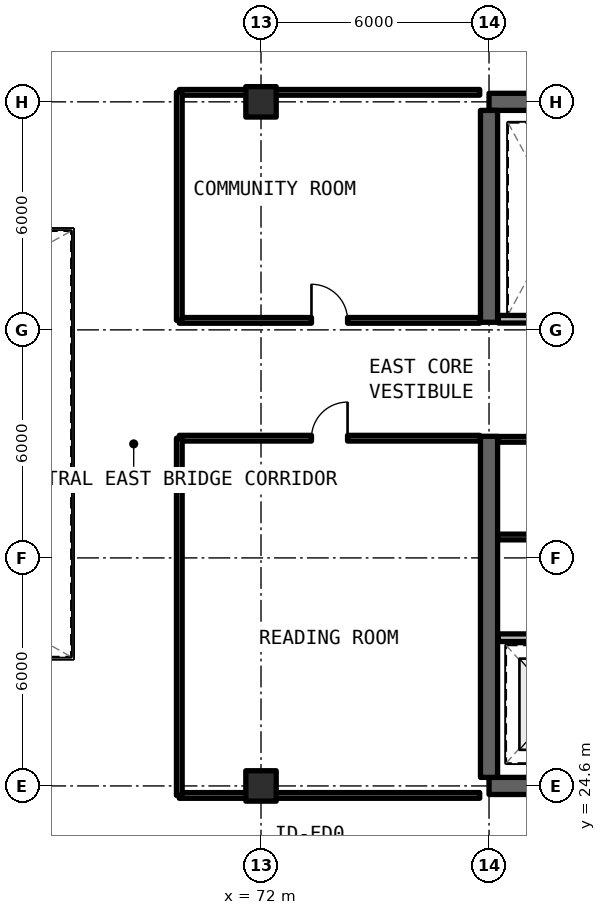
"""IFC4 building model, lengths in metres.
Left out: names, types, materials, properties, quantities, classifications, styles, units other than length and angle.
Written with IfcOpenShell. Run it as: python <this file> out.ifc"""

import sys

from ifc_helpers import new_model, si_unit, direction, frame, frame_2d, origin, origin_2d, place, context, subcontext, project, spatial, rectangle, extrude, element, fill, save


model = new_model("IFC4")
c1 = context("Model", 3, precision=1e-05, world=origin(), true_north=direction((0.0, 1.0)))
c2 = subcontext(c1, "Body", "Model", "MODEL_VIEW")
j1 = project(units=[si_unit("LENGTHUNIT", "METRE"), si_unit("PLANEANGLEUNIT", "RADIAN")], contexts=[c1])
p1 = place(None, origin())
s1 = spatial("IfcSite", under=j1, at=p1, CompositionType="ELEMENT")
p2 = place(p1, origin())
s2 = spatial("IfcBuilding", under=s1, at=p2, CompositionType="ELEMENT")
p3 = place(p2, frame((0.0, 0.0, 185.13)))
s3 = spatial("IfcBuildingStorey", under=s2, at=p3, CompositionType="ELEMENT", Elevation=185.13)
for number, where, z_axis, x_axis in (
    (1, (78.0, 24.6, 0.0), (0.0, 0.0, 1.0), (1.0, 0.0, 0.0)),
    (2, (90.0, 42.6, 0.0), (0.0, 0.0, 1.0), (-1.0, 0.0, 0.0)),
):
    element("IfcWall", number, at=place(p3, frame(where, z_axis=z_axis, x_axis=x_axis)), inside=s3, PredefinedType="SHEAR", context=c2, shape_type="SweptSolid", body=[
        extrude(rectangle(XDim=12.0, YDim=0.45, at=frame_2d((6.0, 0.0))), origin(), (0.0, 0.0, 1.0), 3.3),
    ])
p4 = place(p3, frame((78.0, 24.825, 0.0), z_axis=(0.0, 0.0, 1.0), x_axis=(0.0, 1.0, 0.0)))
e3 = element("IfcWall", 3, at=p4, inside=s3, PredefinedType="SHEAR", context=c2, shape_type="SweptSolid", body=[
    extrude(rectangle(XDim=8.975, YDim=0.45, at=frame_2d((4.488, 0.0))), origin(), (0.0, 0.0, 1.0), 3.3),
])
p5 = place(p3, frame((78.0, 36.8, 0.0), z_axis=(0.0, 0.0, 1.0), x_axis=(0.0, 1.0, 0.0)))
e4 = element("IfcWall", 4, at=p5, inside=s3, PredefinedType="SHEAR", context=c2, shape_type="SweptSolid", body=[
    extrude(rectangle(XDim=5.575, YDim=0.45, at=frame_2d((2.788, 0.0))), origin(), (0.0, 0.0, 1.0), 3.3),
])
for number, where, z_axis, x_axis in (
    (5, (72.0, 24.6, 0.0), (0.0, 0.0, 1.0), (1.0, 0.0, 0.0)),
    (6, (72.0, 42.6, 0.0), (0.0, 0.0, 1.0), (1.0, 0.0, 0.0)),
):
    element("IfcColumn", number, at=place(p3, frame(where, z_axis=z_axis, x_axis=x_axis)), inside=s3, PredefinedType="COLUMN", context=c2, shape_type="SweptSolid", body=[
        extrude(rectangle(XDim=0.8, YDim=0.8, at=origin_2d()), origin(), (0.0, 0.0, 1.0), 3.3),
    ])
p6 = place(p3, frame((78.245, 28.5, 0.0), z_axis=(0.0, 0.0, 1.0), x_axis=(1.0, 0.0, 0.0)))
e7 = element("IfcWall", 7, at=p6, inside=s3, PredefinedType="SOLIDWALL", context=c2, shape_type="SweptSolid", body=[
    extrude(rectangle(XDim=7.585, YDim=0.2, at=frame_2d((3.792, 0.0))), origin(), (0.0, 0.0, 1.0), 2.35),
])
p7 = place(p6, frame((3.555, 0.0, 0.0)))
e8 = element("IfcOpeningElement", 8, at=p7, cuts=e7, PredefinedType="OPENING", context=c2, shape_type="SweptSolid", body=[
    extrude(rectangle(XDim=1.0, YDim=2.15, at=frame_2d((0.5, 1.075))), frame((0.0, 0.11, 0.0), z_axis=(0.0, -1.0, 0.0), x_axis=(1.0, 0.0, 0.0)), (0.0, 0.0, 1.0), 0.22),
])
for number, where, z_axis, x_axis in (
    (9, (78.245, 31.15, 0.0), (0.0, 0.0, 1.0), (1.0, 0.0, 0.0)),
    (10, (78.245, 33.72, 0.0), (0.0, 0.0, 1.0), (1.0, 0.0, 0.0)),
):
    element("IfcWall", number, at=place(p3, frame(where, z_axis=z_axis, x_axis=x_axis)), inside=s3, PredefinedType="SOLIDWALL", context=c2, shape_type="SweptSolid", body=[
        extrude(rectangle(XDim=3.075, YDim=0.15, at=frame_2d((1.538, 0.0))), origin(), (0.0, 0.0, 1.0), 2.35),
    ])
p8 = place(p3, frame((78.245, 36.88, 0.0), z_axis=(0.0, 0.0, 1.0), x_axis=(1.0, 0.0, 0.0)))
e11 = element("IfcWall", 11, at=p8, inside=s3, PredefinedType="SOLIDWALL", context=c2, shape_type="SweptSolid", body=[
    extrude(rectangle(XDim=3.075, YDim=0.2, at=frame_2d((1.538, 0.0))), origin(), (0.0, 0.0, 1.0), 2.35),
])
p9 = place(p3, frame((69.85, 24.35, 0.0), z_axis=(0.0, 0.0, 1.0), x_axis=(1.0, 0.0, 0.0)))
e12 = element("IfcWall", 12, at=p9, inside=s3, PredefinedType="SOLIDWALL", context=c2, shape_type="SweptSolid", body=[
    extrude(rectangle(XDim=7.905, YDim=0.15, at=frame_2d((3.952, 0.0))), origin(), (0.0, 0.0, 1.0), 2.35),
])
p10 = place(p3, frame((69.85, 33.75, 0.0), z_axis=(0.0, 0.0, 1.0), x_axis=(1.0, 0.0, 0.0)))
e13 = element("IfcWall", 13, at=p10, inside=s3, PredefinedType="SOLIDWALL", context=c2, shape_type="SweptSolid", body=[
    extrude(rectangle(XDim=7.905, YDim=0.15, at=frame_2d((3.952, 0.0))), origin(), (0.0, 0.0, 1.0), 2.35),
])
p11 = place(p10, frame((3.478, 0.0, 0.0)))
e14 = element("IfcOpeningElement", 14, at=p11, cuts=e13, PredefinedType="OPENING", context=c2, shape_type="SweptSolid", body=[
    extrude(rectangle(XDim=0.95, YDim=2.15, at=frame_2d((0.475, 1.075))), frame((0.0, 0.085, 0.0), z_axis=(0.0, -1.0, 0.0), x_axis=(1.0, 0.0, 0.0)), (0.0, 0.0, 1.0), 0.17),
])
p12 = place(p3, frame((69.85, 24.35, 0.0), z_axis=(0.0, 0.0, 1.0), x_axis=(0.0, 1.0, 0.0)))
e15 = element("IfcWall", 15, at=p12, inside=s3, PredefinedType="SOLIDWALL", context=c2, shape_type="SweptSolid", body=[
    extrude(rectangle(XDim=9.4, YDim=0.15, at=frame_2d((4.7, 0.0))), origin(), (0.0, 0.0, 1.0), 2.35),
])
p13 = place(p3, frame((69.85, 36.85, 0.0), z_axis=(0.0, 0.0, 1.0), x_axis=(1.0, 0.0, 0.0)))
e16 = element("IfcWall", 16, at=p13, inside=s3, PredefinedType="SOLIDWALL", context=c2, shape_type="SweptSolid", body=[
    extrude(rectangle(XDim=7.905, YDim=0.15, at=frame_2d((3.952, 0.0))), origin(), (0.0, 0.0, 1.0), 2.35),
])
p14 = place(p13, frame((3.478, 0.0, 0.0)))
e17 = element("IfcOpeningElement", 17, at=p14, cuts=e16, PredefinedType="OPENING", context=c2, shape_type="SweptSolid", body=[
    extrude(rectangle(XDim=0.95, YDim=2.15, at=frame_2d((0.475, 1.075))), frame((0.0, 0.085, 0.0), z_axis=(0.0, -1.0, 0.0), x_axis=(1.0, 0.0, 0.0)), (0.0, 0.0, 1.0), 0.17),
])
p15 = place(p3, frame((69.85, 42.85, 0.0), z_axis=(0.0, 0.0, 1.0), x_axis=(1.0, 0.0, 0.0)))
e18 = element("IfcWall", 18, at=p15, inside=s3, PredefinedType="SOLIDWALL", context=c2, shape_type="SweptSolid", body=[
    extrude(rectangle(XDim=7.905, YDim=0.15, at=frame_2d((3.952, 0.0))), origin(), (0.0, 0.0, 1.0), 2.35),
])
p16 = place(p3, frame((69.85, 36.85, 0.0), z_axis=(0.0, 0.0, 1.0), x_axis=(0.0, 1.0, 0.0)))
e19 = element("IfcWall", 19, at=p16, inside=s3, PredefinedType="SOLIDWALL", context=c2, shape_type="SweptSolid", body=[
    extrude(rectangle(XDim=6.0, YDim=0.15, at=frame_2d((3.0, 0.0))), origin(), (0.0, 0.0, 1.0), 2.35),
])
p17 = place(p11, origin())
e20 = element("IfcDoor", 20, at=p17, inside=s3, OperationType="SINGLE_SWING_RIGHT", PredefinedType="DOOR", context=c2, shape_type="SweptSolid", body=[
    extrude(rectangle(XDim=0.95, YDim=2.15, at=frame_2d((0.475, 1.075))), frame((0.0, 0.025, 0.0), z_axis=(0.0, -1.0, 0.0), x_axis=(1.0, 0.0, 0.0)), (0.0, 0.0, 1.0), 0.05),
])
fill(e14, e20)
p18 = place(p14, origin())
e21 = element("IfcDoor", 21, at=p18, inside=s3, OperationType="SINGLE_SWING_LEFT", PredefinedType="DOOR", context=c2, shape_type="SweptSolid", body=[
    extrude(rectangle(XDim=0.95, YDim=2.15, at=frame_2d((0.475, 1.075))), frame((0.0, 0.025, 0.0), z_axis=(0.0, -1.0, 0.0), x_axis=(1.0, 0.0, 0.0)), (0.0, 0.0, 1.0), 0.05),
])
fill(e17, e21)
save(model, sys.argv[1])
